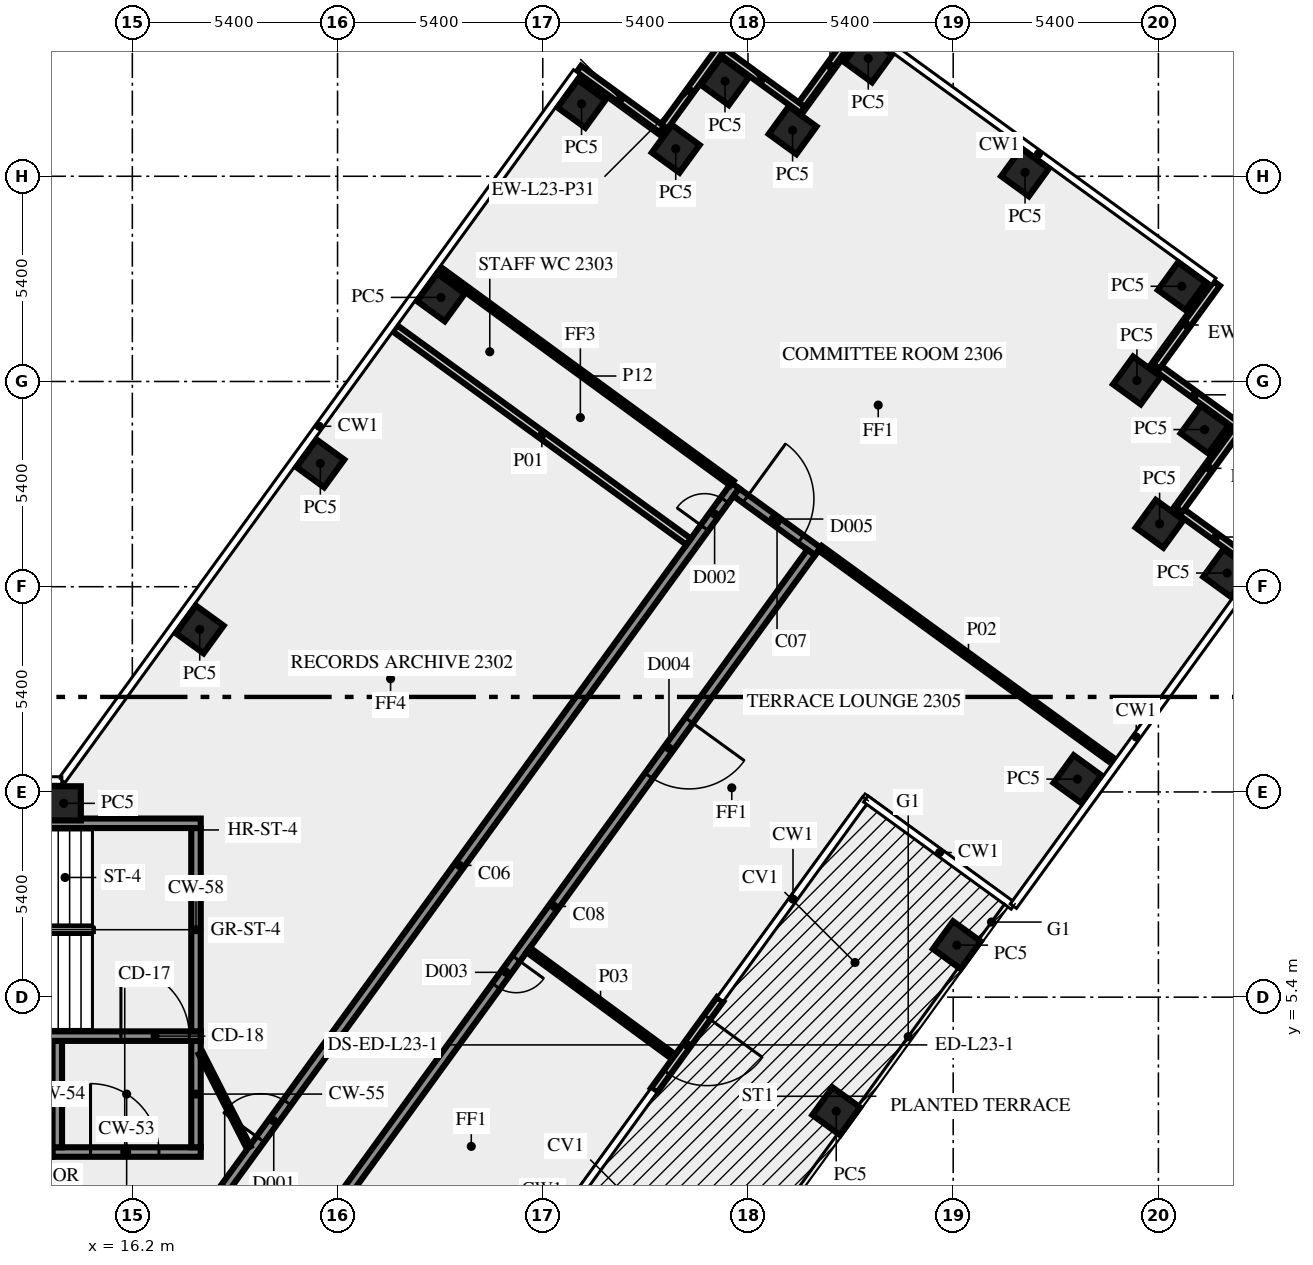
"""IFC4 building model, lengths in metres.
Left out: names, types, materials, properties, quantities, classifications, styles, units other than length and angle.
Written with IfcOpenShell. Run it as: python <this file> out.ifc"""

import sys

from ifc_helpers import new_model, si_unit, direction, frame, frame_2d, origin, origin_2d, place, context, subcontext, project, spatial, rectangle, extrude, element, fill, save


model = new_model("IFC4")
c1 = context("Model", 3, precision=1e-05, world=origin(), true_north=direction((0.0, 1.0)))
c2 = subcontext(c1, "Body", "Model", "MODEL_VIEW")
j1 = project(units=[si_unit("LENGTHUNIT", "METRE"), si_unit("PLANEANGLEUNIT", "RADIAN")], contexts=[c1])
p1 = place(None, origin())
s1 = spatial("IfcSite", under=j1, at=p1, CompositionType="ELEMENT")
p2 = place(p1, origin())
s2 = spatial("IfcBuilding", under=s1, at=p2, CompositionType="ELEMENT")
p3 = place(p2, frame((0.0, 0.0, 101.0)))
s3 = spatial("IfcBuildingStorey", under=s2, at=p3, CompositionType="ELEMENT", Elevation=101.0)
for number, where, z_axis, x_axis in (
    (1, (34.722, 2.4, 0.0), (0.0, 0.0, 1.0), (0.588, 0.809, 0.0)),
    (2, (37.896, 6.769, 0.0), (0.0, 0.0, 1.0), (0.588, 0.809, 0.0)),
    (3, (41.07, 11.137, 0.0), (0.0, 0.0, 1.0), (0.588, 0.809, 0.0)),
    (4, (45.01, 16.56, 0.0), (0.0, 0.0, 1.0), (0.588, 0.809, 0.0)),
    (5, (43.231, 17.854, 0.0), (0.0, 0.0, 1.0), (0.588, 0.809, 0.0)),
    (6, (44.415, 20.335, 0.0), (0.0, 0.0, 1.0), (0.588, 0.809, 0.0)),
    (7, (42.635, 21.626, 0.0), (0.0, 0.0, 1.0), (-0.809, 0.588, 0.0)),
    (8, (43.815, 24.105, 0.0), (0.0, 0.0, 1.0), (-0.809, 0.588, 0.0)),
    (9, (39.691, 27.102, 0.0), (0.0, 0.0, 1.0), (-0.809, 0.588, 0.0)),
    (10, (35.565, 30.1, 0.0), (0.0, 0.0, 1.0), (-0.588, -0.809, 0.0)),
    (11, (33.574, 28.209, 0.0), (0.0, 0.0, 1.0), (-0.809, 0.588, 0.0)),
    (12, (31.795, 29.5, 0.0), (0.0, 0.0, 1.0), (-0.588, -0.809, 0.0)),
    (13, (30.499, 27.723, 0.0), (0.0, 0.0, 1.0), (-0.809, 0.588, 0.0)),
    (14, (28.02, 28.905, 0.0), (0.0, 0.0, 1.0), (-0.809, 0.588, 0.0)),
    (15, (24.321, 23.812, 0.0), (0.0, 0.0, 1.0), (-0.588, -0.809, 0.0)),
    (16, (21.147, 19.444, 0.0), (0.0, 0.0, 1.0), (-0.588, -0.809, 0.0)),
    (17, (17.974, 15.075, 0.0), (0.0, 0.0, 1.0), (-0.588, -0.809, 0.0)),
    (18, (14.395, 10.5, 0.0), (0.0, 0.0, 1.0), (-1.0, 0.0, 0.0)),
):
    element("IfcColumn", number, at=place(p3, frame(where, z_axis=z_axis, x_axis=x_axis)), inside=s3, PredefinedType="COLUMN", context=c2, shape_type="SweptSolid", body=[
        extrude(rectangle(XDim=0.9, YDim=0.9, at=origin_2d()), origin(), (0.0, 0.0, 1.0), 3.65),
    ])
p4 = place(p3, frame((45.761, 16.743, 0.0), z_axis=(0.0, 0.0, 1.0), x_axis=(-0.808979656733, 0.587836639716, 0.0)))
e19 = element("IfcWall", 19, at=p4, inside=s3, PredefinedType="SOLIDWALL", context=c2, shape_type="SweptSolid", body=[
    extrude(rectangle(XDim=2.6, YDim=0.2, at=frame_2d((1.3, 0.0))), origin(), (0.0, 0.0, 1.0), 3.65),
])
for number, where, z_axis, x_axis in (
    (20, (43.746, 18.223, 0.0), (0.0, 0.0, 1.0), (0.588, 0.809, 0.0)),
    (21, (45.245, 20.456, 0.0), (0.0, 0.0, 1.0), (-0.809, 0.588, 0.0)),
):
    element("IfcWall", number, at=place(p3, frame(where, z_axis=z_axis, x_axis=x_axis)), inside=s3, PredefinedType="SOLIDWALL", context=c2, shape_type="SweptSolid", body=[
        extrude(rectangle(XDim=2.7, YDim=0.2, at=frame_2d((1.35, 0.0))), origin(), (0.0, 0.0, 1.0), 3.65),
    ])
p5 = place(p3, frame((31.669, 5.343, 0.0), z_axis=(0.0, 0.0, 1.0), x_axis=(-0.58782869016, -0.808985433135, 0.0)))
e22 = element("IfcWall", 22, at=p5, inside=s3, PredefinedType="SOLIDWALL", context=c2, shape_type="SweptSolid", body=[
    extrude(rectangle(XDim=2.963, YDim=0.2, at=frame_2d((1.481, 0.0))), origin(), (0.0, 0.0, 1.0), 3.65),
])
p6 = place(p5, frame((0.582, 0.0, 0.0)))
e23 = element("IfcOpeningElement", 23, at=p6, cuts=e22, PredefinedType="OPENING", context=c2, shape_type="SweptSolid", body=[
    extrude(rectangle(XDim=1.8, YDim=2.4, at=frame_2d((0.9, 1.2))), frame((0.0, 0.11, 0.0), z_axis=(0.0, -1.0, 0.0), x_axis=(1.0, 0.0, 0.0)), (0.0, 0.0, 1.0), 0.22),
])
for number, where, z_axis, x_axis in (
    (24, (43.149, 21.994, 0.0), (0.0, 0.0, 1.0), (0.588, 0.809, 0.0)),
    (25, (35.351, 30.997, 0.0), (0.0, 0.0, 1.0), (-0.588, -0.809, 0.0)),
    (26, (33.838, 28.744, 0.0), (0.0, 0.0, 1.0), (-0.809, 0.588, 0.0)),
    (27, (31.67, 30.333, 0.0), (0.0, 0.0, 1.0), (-0.588, -0.809, 0.0)),
    (28, (30.133, 28.237, 0.0), (0.0, 0.0, 1.0), (-0.809, 0.588, 0.0)),
):
    element("IfcWall", number, at=place(p3, frame(where, z_axis=z_axis, x_axis=x_axis)), inside=s3, PredefinedType="SOLIDWALL", context=c2, shape_type="SweptSolid", body=[
        extrude(rectangle(XDim=2.7, YDim=0.2, at=frame_2d((1.35, 0.0))), origin(), (0.0, 0.0, 1.0), 3.65),
    ])
p7 = place(p3, frame((14.1, 1.325, 0.0), z_axis=(0.0, 0.0, 1.0), x_axis=(1.0, 0.0, 0.0)))
e29 = element("IfcWall", 29, at=p7, inside=s3, PredefinedType="SHEAR", context=c2, shape_type="SweptSolid", body=[
    extrude(rectangle(XDim=3.9, YDim=0.25, at=frame_2d((1.95, 0.0))), origin(), (0.0, 0.0, 1.0), 3.65),
])
p8 = place(p7, frame((1.0, 0.0, 0.0)))
e30 = element("IfcOpeningElement", 30, at=p8, cuts=e29, PredefinedType="OPENING", context=c2, shape_type="SweptSolid", body=[
    extrude(rectangle(XDim=1.8, YDim=2.1, at=frame_2d((0.9, 1.05))), frame((0.0, 0.135, 0.0), z_axis=(0.0, -1.0, 0.0), x_axis=(1.0, 0.0, 0.0)), (0.0, 0.0, 1.0), 0.27),
])
for number, where, z_axis, x_axis in (
    (31, (14.225, 1.45, 0.0), (0.0, 0.0, 1.0), (0.0, 1.0, 0.0)),
    (32, (17.875, 1.45, 0.0), (0.0, 0.0, 1.0), (0.0, 1.0, 0.0)),
):
    element("IfcWall", number, at=place(p3, frame(where, z_axis=z_axis, x_axis=x_axis)), inside=s3, PredefinedType="SHEAR", context=c2, shape_type="SweptSolid", body=[
        extrude(rectangle(XDim=2.8, YDim=0.25, at=frame_2d((1.4, 0.0))), origin(), (0.0, 0.0, 1.0), 3.65),
    ])
p9 = place(p3, frame((7.5, 4.375, 0.0), z_axis=(0.0, 0.0, 1.0), x_axis=(1.0, 0.0, 0.0)))
e33 = element("IfcWall", 33, at=p9, inside=s3, PredefinedType="SHEAR", context=c2, shape_type="SweptSolid", body=[
    extrude(rectangle(XDim=10.5, YDim=0.25, at=frame_2d((5.25, 0.0))), origin(), (0.0, 0.0, 1.0), 3.65),
])
p10 = place(p9, frame((8.4, 0.0, 0.0)))
e34 = element("IfcOpeningElement", 34, at=p10, cuts=e33, PredefinedType="OPENING", context=c2, shape_type="SweptSolid", body=[
    extrude(rectangle(XDim=1.8, YDim=2.1, at=frame_2d((0.9, 1.05))), frame((0.0, 0.135, 0.0), z_axis=(0.0, -1.0, 0.0), x_axis=(1.0, 0.0, 0.0)), (0.0, 0.0, 1.0), 0.27),
])
p11 = place(p3, frame((17.875, 4.5, 0.0), z_axis=(0.0, 0.0, 1.0), x_axis=(0.0, 1.0, 0.0)))
e35 = element("IfcWall", 35, at=p11, inside=s3, PredefinedType="SHEAR", context=c2, shape_type="SweptSolid", body=[
    extrude(rectangle(XDim=5.35, YDim=0.25, at=frame_2d((2.675, 0.0))), origin(), (0.0, 0.0, 1.0), 3.65),
])
p12 = place(p3, frame((7.5, 9.975, 0.0), z_axis=(0.0, 0.0, 1.0), x_axis=(1.0, 0.0, 0.0)))
e36 = element("IfcWall", 36, at=p12, inside=s3, PredefinedType="SHEAR", context=c2, shape_type="SweptSolid", body=[
    extrude(rectangle(XDim=10.5, YDim=0.25, at=frame_2d((5.25, 0.0))), origin(), (0.0, 0.0, 1.0), 3.65),
])
p13 = place(p12, frame((2.0, 0.0, 1.0)))
e37 = element("IfcOpeningElement", 37, at=p13, cuts=e36, PredefinedType="OPENING", context=c2, shape_type="SweptSolid", body=[
    extrude(rectangle(XDim=1.2, YDim=1.2, at=frame_2d((0.6, 0.6))), frame((0.0, 0.135, 0.0), z_axis=(0.0, -1.0, 0.0), x_axis=(1.0, 0.0, 0.0)), (0.0, 0.0, 1.0), 0.27),
])
p14 = place(p3, frame((17.545, -1.125, 0.0), z_axis=(0.0, 0.0, 1.0), x_axis=(0.587791430994, 0.80901250525, 0.0)))
e38 = element("IfcWall", 38, at=p14, inside=s3, PredefinedType="SOLIDWALL", context=c2, shape_type="SweptSolid", body=[
    extrude(rectangle(XDim=24.703, YDim=0.25, at=frame_2d((12.352, 0.0))), origin(), (0.0, 0.0, 1.0), 3.65),
])
p15 = place(p14, frame((3.442, 0.0, 0.0)))
e39 = element("IfcOpeningElement", 39, at=p15, cuts=e38, PredefinedType="OPENING", context=c2, shape_type="SweptSolid", body=[
    extrude(rectangle(XDim=1.2, YDim=2.1, at=frame_2d((0.6, 1.05))), frame((0.0, 0.135, 0.0), z_axis=(0.0, -1.0, 0.0), x_axis=(1.0, 0.0, 0.0)), (0.0, 0.0, 1.0), 0.27),
])
p16 = place(p14, frame((23.329, 0.0, 0.0)))
e40 = element("IfcOpeningElement", 40, at=p16, cuts=e38, PredefinedType="OPENING", context=c2, shape_type="SweptSolid", body=[
    extrude(rectangle(XDim=0.9, YDim=2.1, at=frame_2d((0.45, 1.05))), frame((0.0, 0.135, 0.0), z_axis=(0.0, -1.0, 0.0), x_axis=(1.0, 0.0, 0.0)), (0.0, 0.0, 1.0), 0.27),
])
p17 = place(p3, frame((32.093, 18.686, 0.0), z_axis=(0.0, 0.0, 1.0), x_axis=(0.809006914995, -0.587799125119, 0.0)))
e41 = element("IfcWall", 41, at=p17, inside=s3, PredefinedType="SOLIDWALL", context=c2, shape_type="SweptSolid", body=[
    extrude(rectangle(XDim=2.65, YDim=0.25, at=frame_2d((1.325, 0.0))), origin(), (0.0, 0.0, 1.0), 3.65),
])
p18 = place(p17, frame((0.3, 0.0, 0.0)))
e42 = element("IfcOpeningElement", 42, at=p18, cuts=e41, PredefinedType="OPENING", context=c2, shape_type="SweptSolid", body=[
    extrude(rectangle(XDim=1.8, YDim=2.1, at=frame_2d((0.9, 1.05))), frame((0.0, 0.135, 0.0), z_axis=(0.0, -1.0, 0.0), x_axis=(1.0, 0.0, 0.0)), (0.0, 0.0, 1.0), 0.27),
])
p19 = place(p3, frame((34.062, 17.101, 0.0), z_axis=(0.0, 0.0, 1.0), x_axis=(-0.58778129431, -0.809019870003, 0.0)))
e43 = element("IfcWall", 43, at=p19, inside=s3, PredefinedType="SOLIDWALL", context=c2, shape_type="SweptSolid", body=[
    extrude(rectangle(XDim=23.021, YDim=0.25, at=frame_2d((11.51, 0.0))), origin(), (0.0, 0.0, 1.0), 3.65),
])
p20 = place(p19, frame((5.465, 0.0, 0.0)))
e44 = element("IfcOpeningElement", 44, at=p20, cuts=e43, PredefinedType="OPENING", context=c2, shape_type="SweptSolid", body=[
    extrude(rectangle(XDim=1.8, YDim=2.1, at=frame_2d((0.9, 1.05))), frame((0.0, 0.135, 0.0), z_axis=(0.0, -1.0, 0.0), x_axis=(1.0, 0.0, 0.0)), (0.0, 0.0, 1.0), 0.27),
])
p21 = place(p19, frame((13.205, 0.0, 0.0)))
e45 = element("IfcOpeningElement", 45, at=p21, cuts=e43, PredefinedType="OPENING", context=c2, shape_type="SweptSolid", body=[
    extrude(rectangle(XDim=0.9, YDim=2.1, at=frame_2d((0.45, 1.05))), frame((0.0, 0.135, 0.0), z_axis=(0.0, -1.0, 0.0), x_axis=(1.0, 0.0, 0.0)), (0.0, 0.0, 1.0), 0.27),
])
p22 = place(p3, frame((30.838, 17.385, 0.0), z_axis=(0.0, 0.0, 1.0), x_axis=(-0.809043311713, 0.587749027879, 0.0)))
e46 = element("IfcWall", 46, at=p22, inside=s3, PredefinedType="SOLIDWALL", context=c2, shape_type="SweptSolid", body=[
    extrude(rectangle(XDim=9.55, YDim=0.2, at=frame_2d((4.775, 0.0))), origin(), (0.0, 0.0, 1.0), 2.75),
])
p23 = place(p3, frame((42.106, 11.54, 0.0), z_axis=(0.0, 0.0, 1.0), x_axis=(-0.808982149318, 0.587833209409, 0.0)))
e47 = element("IfcWall", 47, at=p23, inside=s3, PredefinedType="PARTITIONING", context=c2, shape_type="SweptSolid", body=[
    extrude(rectangle(XDim=9.651, YDim=0.15, at=frame_2d((4.825, 0.0))), origin(), (0.0, 0.0, 1.0), 2.75),
])
p24 = place(p3, frame((26.619, 6.643, 0.0), z_axis=(0.0, 0.0, 1.0), x_axis=(0.805845547864, -0.592125791524, 0.0)))
e48 = element("IfcWall", 48, at=p24, inside=s3, PredefinedType="PARTITIONING", context=c2, shape_type="SweptSolid", body=[
    extrude(rectangle(XDim=4.72, YDim=0.15, at=frame_2d((2.36, 0.0))), origin(), (0.0, 0.0, 1.0), 3.65),
])
p25 = place(p3, frame((24.251, 24.566, 0.0), z_axis=(0.0, 0.0, 1.0), x_axis=(0.807588329082, -0.589746632657, 0.0)))
e49 = element("IfcWall", 49, at=p25, inside=s3, PredefinedType="PARTITIONING", context=c2, shape_type="SweptSolid", body=[
    extrude(rectangle(XDim=9.57, YDim=0.15, at=frame_2d((4.785, 0.0))), origin(), (0.0, 0.0, 1.0), 2.75),
])
p26 = place(p3, frame((18.0, 3.925, 0.0), z_axis=(0.0, 0.0, 1.0), x_axis=(0.453950796792, -0.891026752736, 0.0)))
e50 = element("IfcWall", 50, at=p26, inside=s3, PredefinedType="PARTITIONING", context=c2, shape_type="SweptSolid", body=[
    extrude(rectangle(XDim=2.778, YDim=0.12, at=frame_2d((1.389, 0.0))), origin(), (0.0, 0.0, 1.0), 3.65),
])
p27 = place(p6, origin())
e51 = element("IfcDoor", 51, at=p27, inside=s3, OperationType="DOUBLE_DOOR_SINGLE_SWING", PredefinedType="DOOR", context=c2, shape_type="SweptSolid", body=[
    extrude(rectangle(XDim=1.8, YDim=2.4, at=frame_2d((0.9, 1.2))), frame((0.0, 0.025, 0.0), z_axis=(0.0, -1.0, 0.0), x_axis=(1.0, 0.0, 0.0)), (0.0, 0.0, 1.0), 0.05),
])
fill(e23, e51)
p28 = place(p8, origin())
e52 = element("IfcDoor", 52, at=p28, inside=s3, OperationType="DOUBLE_DOOR_SINGLE_SWING", PredefinedType="DOOR", context=c2, shape_type="SweptSolid", body=[
    extrude(rectangle(XDim=1.8, YDim=2.1, at=frame_2d((0.9, 1.05))), frame((0.0, 0.025, 0.0), z_axis=(0.0, -1.0, 0.0), x_axis=(1.0, 0.0, 0.0)), (0.0, 0.0, 1.0), 0.05),
])
fill(e30, e52)
p29 = place(p10, origin())
e53 = element("IfcDoor", 53, at=p29, inside=s3, OperationType="DOUBLE_DOOR_SINGLE_SWING", PredefinedType="DOOR", context=c2, shape_type="SweptSolid", body=[
    extrude(rectangle(XDim=1.8, YDim=2.1, at=frame_2d((0.9, 1.05))), frame((0.0, 0.025, 0.0), z_axis=(0.0, -1.0, 0.0), x_axis=(1.0, 0.0, 0.0)), (0.0, 0.0, 1.0), 0.05),
])
fill(e34, e53)
p30 = place(p15, origin())
e54 = element("IfcDoor", 54, at=p30, inside=s3, OperationType="SINGLE_SWING_LEFT", PredefinedType="DOOR", context=c2, shape_type="SweptSolid", body=[
    extrude(rectangle(XDim=1.2, YDim=2.1, at=frame_2d((0.6, 1.05))), frame((0.0, 0.025, 0.0), z_axis=(0.0, -1.0, 0.0), x_axis=(1.0, 0.0, 0.0)), (0.0, 0.0, 1.0), 0.05),
])
fill(e39, e54)
p31 = place(p20, origin())
e55 = element("IfcDoor", 55, at=p31, inside=s3, OperationType="DOUBLE_DOOR_SINGLE_SWING", PredefinedType="DOOR", context=c2, shape_type="SweptSolid", body=[
    extrude(rectangle(XDim=1.8, YDim=2.1, at=frame_2d((0.9, 1.05))), frame((0.0, 0.025, 0.0), z_axis=(0.0, -1.0, 0.0), x_axis=(1.0, 0.0, 0.0)), (0.0, 0.0, 1.0), 0.05),
])
fill(e44, e55)
p32 = place(p18, origin())
e56 = element("IfcDoor", 56, at=p32, inside=s3, OperationType="DOUBLE_DOOR_SINGLE_SWING", PredefinedType="DOOR", context=c2, shape_type="SweptSolid", body=[
    extrude(rectangle(XDim=1.8, YDim=2.1, at=frame_2d((0.9, 1.05))), frame((0.0, 0.025, 0.0), z_axis=(0.0, -1.0, 0.0), x_axis=(1.0, 0.0, 0.0)), (0.0, 0.0, 1.0), 0.05),
])
fill(e42, e56)
p33 = place(p21, origin())
e57 = element("IfcDoor", 57, at=p33, inside=s3, OperationType="SINGLE_SWING_LEFT", PredefinedType="DOOR", context=c2, shape_type="SweptSolid", body=[
    extrude(rectangle(XDim=0.9, YDim=2.1, at=frame_2d((0.45, 1.05))), frame((0.0, 0.025, 0.0), z_axis=(0.0, -1.0, 0.0), x_axis=(1.0, 0.0, 0.0)), (0.0, 0.0, 1.0), 0.05),
])
fill(e45, e57)
p34 = place(p16, origin())
e58 = element("IfcDoor", 58, at=p34, inside=s3, OperationType="SINGLE_SWING_RIGHT", PredefinedType="DOOR", context=c2, shape_type="SweptSolid", body=[
    extrude(rectangle(XDim=0.9, YDim=2.1, at=frame_2d((0.45, 1.05))), frame((0.0, 0.025, 0.0), z_axis=(0.0, -1.0, 0.0), x_axis=(1.0, 0.0, 0.0)), (0.0, 0.0, 1.0), 0.05),
])
fill(e40, e58)
save(model, sys.argv[1])
